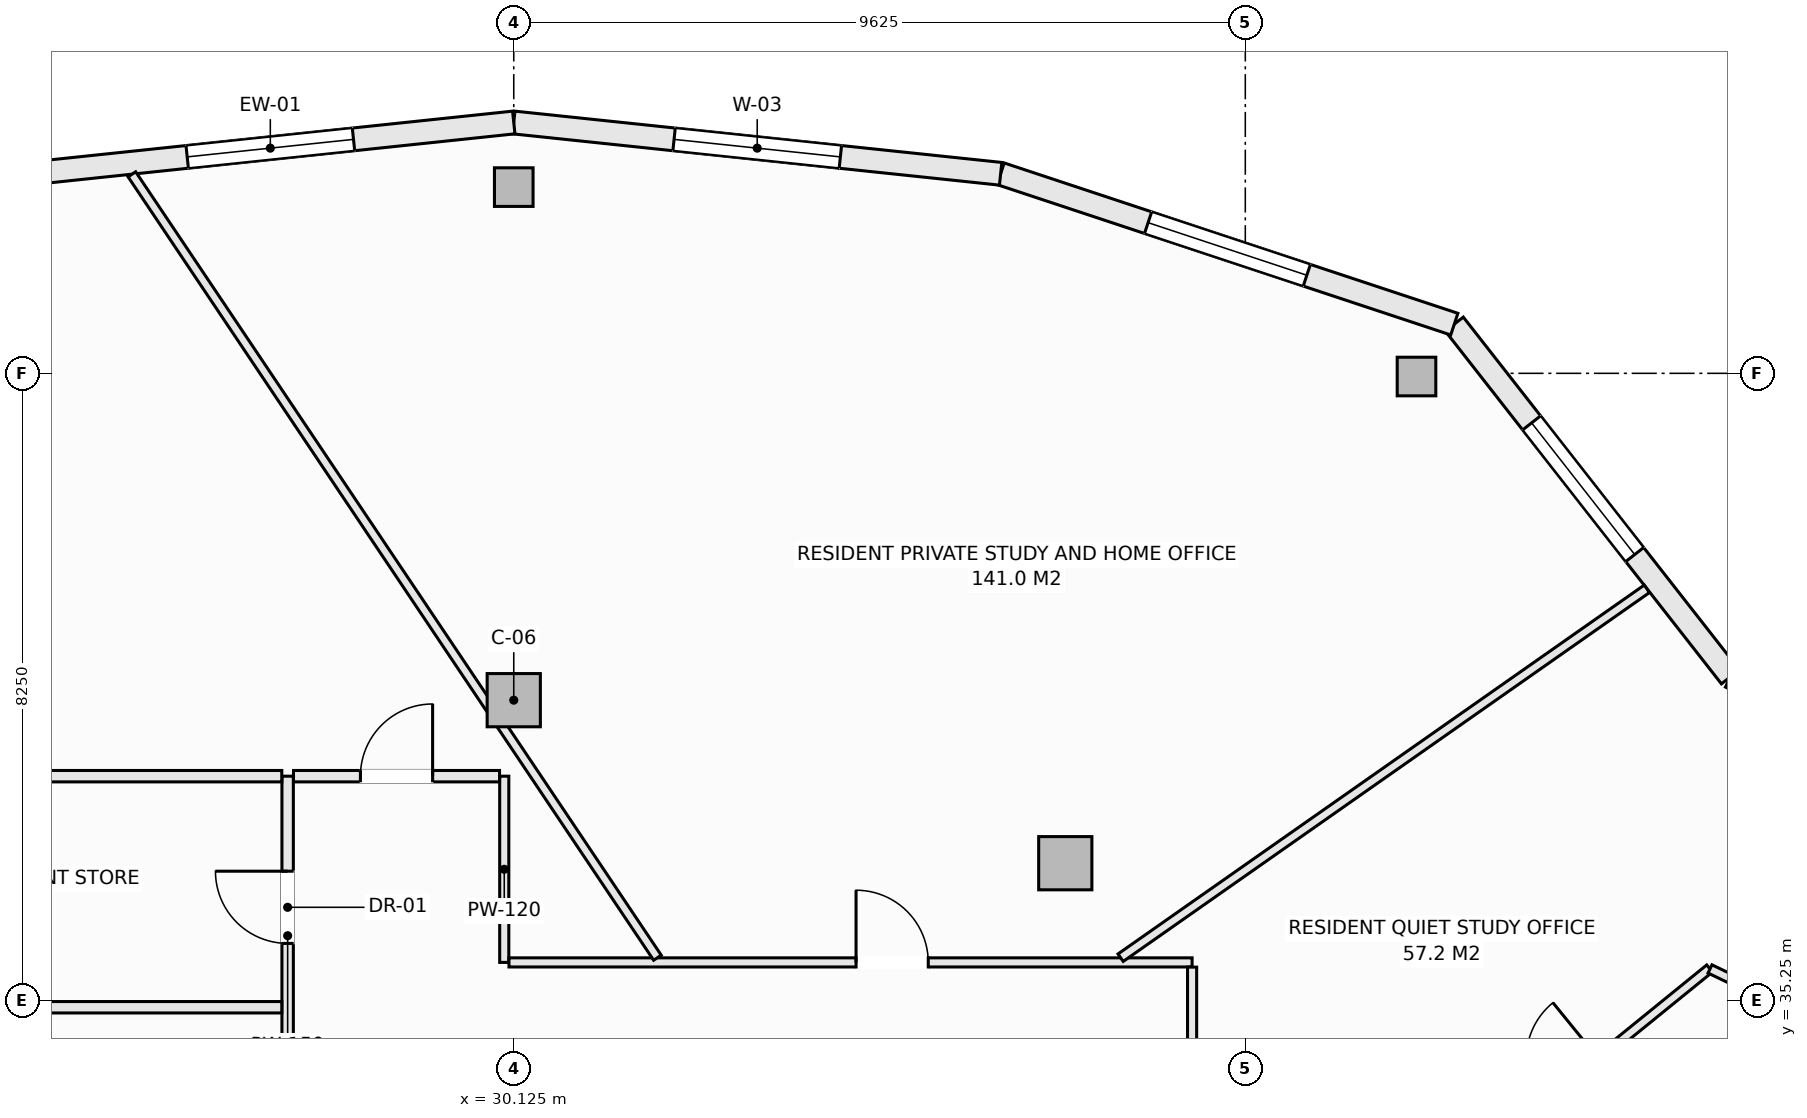
"""IFC4 building model, lengths in metres.
Left out: names, types, materials, properties, quantities, classifications, styles, units other than length and angle.
Written with IfcOpenShell. Run it as: python <this file> out.ifc"""

import sys

from ifc_helpers import new_model, si_unit, direction, frame, frame_2d, origin, origin_2d, place, context, subcontext, project, spatial, rectangle, hollow_rectangle, extrude, element, fill, save


model = new_model("IFC4")
c1 = context("Model", 3, precision=1e-05, world=origin(), true_north=direction((0.0, 1.0)))
c2 = subcontext(c1, "Body", "Model", "MODEL_VIEW")
j1 = project(units=[si_unit("LENGTHUNIT", "METRE"), si_unit("PLANEANGLEUNIT", "RADIAN")], contexts=[c1])
p1 = place(None, origin())
s1 = spatial("IfcSite", under=j1, at=p1, CompositionType="ELEMENT")
p2 = place(p1, origin())
s2 = spatial("IfcBuilding", under=s1, at=p2, CompositionType="ELEMENT")
p3 = place(p2, frame((0.0, 0.0, 222.8)))
s3 = spatial("IfcBuildingStorey", under=s2, at=p3, CompositionType="ELEMENT", Elevation=222.8)
for number, where, z_axis, x_axis in (
    (1, (42.003, 43.458, -0.27), (0.0, 0.0, 1.0), (1.0, 0.0, 0.0)),
    (2, (30.125, 45.95, -0.27), (0.0, 0.0, 1.0), (1.0, 0.0, 0.0)),
):
    element("IfcColumn", number, at=place(p3, frame(where, z_axis=z_axis, x_axis=x_axis)), inside=s3, PredefinedType="COLUMN", context=c2, shape_type="SweptSolid", body=[
        extrude(hollow_rectangle(XDim=0.508, YDim=0.508, WallThickness=0.019, at=origin_2d()), origin(), (0.0, 0.0, 1.0), 3.3),
    ])
for number, where, z_axis, x_axis in (
    (3, (37.382, 37.055, -0.27), (0.0, 0.0, 1.0), (1.0, 0.0, 0.0)),
    (4, (30.125, 39.2, -0.27), (0.0, 0.0, 1.0), (1.0, 0.0, 0.0)),
):
    element("IfcColumn", number, at=place(p3, frame(where, z_axis=z_axis, x_axis=x_axis)), inside=s3, PredefinedType="COLUMN", context=c2, shape_type="SweptSolid", body=[
        extrude(rectangle(XDim=0.7, YDim=0.7, at=origin_2d()), origin(), (0.0, 0.0, 1.0), 3.3),
    ])
p4 = place(p3, frame((46.133, 39.507, 0.0), z_axis=(0.0, 0.0, 1.0), x_axis=(0.901348331142, -0.433094892545, 0.0)))
e5 = element("IfcWall", 5, at=p4, inside=s3, PredefinedType="SOLIDWALL", context=c2, shape_type="SweptSolid", body=[
    extrude(rectangle(XDim=6.021, YDim=0.3, at=frame_2d((3.01, 0.0))), origin(), (0.0, 0.0, 1.0), 2.605),
])
p5 = place(p4, frame((1.91, 0.0, 0.72)))
e6 = element("IfcOpeningElement", 6, at=p5, cuts=e5, PredefinedType="OPENING", context=c2, shape_type="SweptSolid", body=[
    extrude(rectangle(XDim=2.2, YDim=1.65, at=frame_2d((1.1, 0.825))), frame((0.0, 0.16, 0.0), z_axis=(0.0, -1.0, 0.0), x_axis=(1.0, 0.0, 0.0)), (0.0, 0.0, 1.0), 0.32),
])
p6 = place(p3, frame((42.5, 44.147, 0.0), z_axis=(0.0, 0.0, 1.0), x_axis=(0.616450126935, -0.787393955401, 0.0)))
e7 = element("IfcWall", 7, at=p6, inside=s3, PredefinedType="SOLIDWALL", context=c2, shape_type="SweptSolid", body=[
    extrude(rectangle(XDim=5.893, YDim=0.3, at=frame_2d((2.946, 0.0))), origin(), (0.0, 0.0, 1.0), 2.605),
])
p7 = place(p6, frame((1.65, 0.0, 0.72)))
e8 = element("IfcOpeningElement", 8, at=p7, cuts=e7, PredefinedType="OPENING", context=c2, shape_type="SweptSolid", body=[
    extrude(rectangle(XDim=2.2, YDim=1.65, at=frame_2d((1.1, 0.825))), frame((0.0, 0.16, 0.0), z_axis=(0.0, -1.0, 0.0), x_axis=(1.0, 0.0, 0.0)), (0.0, 0.0, 1.0), 0.32),
])
p8 = place(p3, frame((36.531, 46.125, 0.0), z_axis=(0.0, 0.0, 1.0), x_axis=(0.949240877604, -0.314550085495, 0.0)))
e9 = element("IfcWall", 9, at=p8, inside=s3, PredefinedType="SOLIDWALL", context=c2, shape_type="SweptSolid", body=[
    extrude(rectangle(XDim=6.288, YDim=0.3, at=frame_2d((3.144, 0.0))), origin(), (0.0, 0.0, 1.0), 2.605),
])
p9 = place(p8, frame((2.044, 0.0, 0.72)))
e10 = element("IfcOpeningElement", 10, at=p9, cuts=e9, PredefinedType="OPENING", context=c2, shape_type="SweptSolid", body=[
    extrude(rectangle(XDim=2.2, YDim=1.65, at=frame_2d((1.1, 0.825))), frame((0.0, 0.16, 0.0), z_axis=(0.0, -1.0, 0.0), x_axis=(1.0, 0.0, 0.0)), (0.0, 0.0, 1.0), 0.32),
])
p10 = place(p3, frame((30.125, 46.8, 0.0), z_axis=(0.0, 0.0, 1.0), x_axis=(0.994497142298, -0.104763705363, 0.0)))
e11 = element("IfcWall", 11, at=p10, inside=s3, PredefinedType="SOLIDWALL", context=c2, shape_type="SweptSolid", body=[
    extrude(rectangle(XDim=6.441, YDim=0.3, at=frame_2d((3.221, 0.0))), origin(), (0.0, 0.0, 1.0), 2.605),
])
p11 = place(p10, frame((2.121, 0.0, 0.72)))
e12 = element("IfcOpeningElement", 12, at=p11, cuts=e11, PredefinedType="OPENING", context=c2, shape_type="SweptSolid", body=[
    extrude(rectangle(XDim=2.2, YDim=1.65, at=frame_2d((1.1, 0.825))), frame((0.0, 0.16, 0.0), z_axis=(0.0, -1.0, 0.0), x_axis=(1.0, 0.0, 0.0)), (0.0, 0.0, 1.0), 0.32),
])
p12 = place(p3, frame((23.719, 46.125, 0.0), z_axis=(0.0, 0.0, 1.0), x_axis=(0.994497142298, 0.104763705363, 0.0)))
e13 = element("IfcWall", 13, at=p12, inside=s3, PredefinedType="SOLIDWALL", context=c2, shape_type="SweptSolid", body=[
    extrude(rectangle(XDim=6.441, YDim=0.3, at=frame_2d((3.221, 0.0))), origin(), (0.0, 0.0, 1.0), 2.605),
])
p13 = place(p12, frame((2.121, 0.0, 0.72)))
e14 = element("IfcOpeningElement", 14, at=p13, cuts=e13, PredefinedType="OPENING", context=c2, shape_type="SweptSolid", body=[
    extrude(rectangle(XDim=2.2, YDim=1.65, at=frame_2d((1.1, 0.825))), frame((0.0, 0.16, 0.0), z_axis=(0.0, -1.0, 0.0), x_axis=(1.0, 0.0, 0.0)), (0.0, 0.0, 1.0), 0.32),
])
p14 = place(p3, frame((27.15, 34.002, 0.0), z_axis=(0.0, 0.0, 1.0), x_axis=(0.0, 1.0, 0.0)))
e15 = element("IfcWall", 15, at=p14, inside=s3, PredefinedType="PARTITIONING", context=c2, shape_type="SweptSolid", body=[
    extrude(rectangle(XDim=4.198, YDim=0.15, at=frame_2d((2.099, 0.0))), origin(), (0.0, 0.0, 1.0), 3.03),
])
p15 = place(p14, frame((1.998, 0.0, 0.0)))
e16 = element("IfcOpeningElement", 16, at=p15, cuts=e15, PredefinedType="OPENING", context=c2, shape_type="SweptSolid", body=[
    extrude(rectangle(XDim=0.95, YDim=2.1, at=frame_2d((0.475, 1.05))), frame((0.0, 0.085, 0.0), z_axis=(0.0, -1.0, 0.0), x_axis=(1.0, 0.0, 0.0)), (0.0, 0.0, 1.0), 0.17),
])
p16 = place(p3, frame((30.0, 35.75, 0.0), z_axis=(0.0, 0.0, 1.0), x_axis=(0.0, 1.0, 0.0)))
e17 = element("IfcWall", 17, at=p16, inside=s3, PredefinedType="PARTITIONING", context=c2, shape_type="SweptSolid", body=[
    extrude(rectangle(XDim=2.45, YDim=0.12, at=frame_2d((1.225, 0.0))), origin(), (0.0, 0.0, 1.0), 3.03),
])
p17 = place(p3, frame((18.5, 35.16, 0.0), z_axis=(0.0, 0.0, 1.0), x_axis=(1.0, 0.0, 0.0)))
e18 = element("IfcWall", 18, at=p17, inside=s3, PredefinedType="PARTITIONING", context=c2, shape_type="SweptSolid", body=[
    extrude(rectangle(XDim=8.573, YDim=0.15, at=frame_2d((4.287, 0.0))), origin(), (0.0, 0.0, 1.0), 3.03),
])
p18 = place(p3, frame((18.577, 38.2, 0.0), z_axis=(0.0, 0.0, 1.0), x_axis=(1.0, 0.0, 0.0)))
e19 = element("IfcWall", 19, at=p18, inside=s3, PredefinedType="PARTITIONING", context=c2, shape_type="SweptSolid", body=[
    extrude(rectangle(XDim=8.496, YDim=0.15, at=frame_2d((4.248, 0.0))), origin(), (0.0, 0.0, 1.0), 3.03),
])
p19 = place(p3, frame((27.227, 38.2, 0.0), z_axis=(0.0, 0.0, 1.0), x_axis=(1.0, 0.0, 0.0)))
e20 = element("IfcWall", 20, at=p19, inside=s3, PredefinedType="PARTITIONING", context=c2, shape_type="SweptSolid", body=[
    extrude(rectangle(XDim=2.711, YDim=0.15, at=frame_2d((1.355, 0.0))), origin(), (0.0, 0.0, 1.0), 3.03),
])
p20 = place(p19, frame((0.881, 0.0, 0.0)))
e21 = element("IfcOpeningElement", 21, at=p20, cuts=e20, PredefinedType="OPENING", context=c2, shape_type="SweptSolid", body=[
    extrude(rectangle(XDim=0.95, YDim=2.1, at=frame_2d((0.475, 1.05))), frame((0.0, 0.085, 0.0), z_axis=(0.0, -1.0, 0.0), x_axis=(1.0, 0.0, 0.0)), (0.0, 0.0, 1.0), 0.17),
])
p21 = place(p3, frame((30.062, 35.75, 0.0), z_axis=(0.0, 0.0, 1.0), x_axis=(1.0, 0.0, 0.0)))
e22 = element("IfcWall", 22, at=p21, inside=s3, PredefinedType="PARTITIONING", context=c2, shape_type="SweptSolid", body=[
    extrude(rectangle(XDim=8.988, YDim=0.12, at=frame_2d((4.494, 0.0))), origin(), (0.0, 0.0, 1.0), 2.478),
])
p22 = place(p21, frame((4.567, 0.0, 0.0)))
e23 = element("IfcOpeningElement", 23, at=p22, cuts=e22, PredefinedType="OPENING", context=c2, shape_type="SweptSolid", body=[
    extrude(rectangle(XDim=0.95, YDim=2.1, at=frame_2d((0.475, 1.05))), frame((0.0, 0.07, 0.0), z_axis=(0.0, -1.0, 0.0), x_axis=(1.0, 0.0, 0.0)), (0.0, 0.0, 1.0), 0.14),
])
p23 = place(p3, frame((39.05, 33.75, 0.0), z_axis=(0.0, 0.0, 1.0), x_axis=(0.0, 1.0, 0.0)))
e24 = element("IfcWall", 24, at=p23, inside=s3, PredefinedType="PARTITIONING", context=c2, shape_type="SweptSolid", body=[
    extrude(rectangle(XDim=1.938, YDim=0.12, at=frame_2d((0.969, 0.0))), origin(), (0.0, 0.0, 1.0), 3.03),
])
p24 = place(p3, frame((42.196, 32.696, 0.0), z_axis=(0.0, 0.0, 1.0), x_axis=(0.776319732197, 0.630339331949, 0.0)))
e25 = element("IfcWall", 25, at=p24, inside=s3, PredefinedType="PARTITIONING", context=c2, shape_type="SweptSolid", body=[
    extrude(rectangle(XDim=4.718, YDim=0.12, at=frame_2d((2.359, 0.0))), origin(), (0.0, 0.0, 1.0), 2.77),
])
p25 = place(p24, frame((1.884, 0.0, 0.0)))
e26 = element("IfcOpeningElement", 26, at=p25, cuts=e25, PredefinedType="OPENING", context=c2, shape_type="SweptSolid", body=[
    extrude(rectangle(XDim=0.95, YDim=2.1, at=frame_2d((0.475, 1.05))), frame((0.0, 0.07, 0.0), z_axis=(0.0, -1.0, 0.0), x_axis=(1.0, 0.0, 0.0)), (0.0, 0.0, 1.0), 0.14),
])
p26 = place(p3, frame((45.864, 35.664, 0.0), z_axis=(0.0, 0.0, 1.0), x_axis=(0.901492416592, -0.432794896951, 0.0)))
e27 = element("IfcWall", 27, at=p26, inside=s3, PredefinedType="PARTITIONING", context=c2, shape_type="SweptSolid", body=[
    extrude(rectangle(XDim=2.611, YDim=0.12, at=frame_2d((1.306, 0.0))), origin(), (0.0, 0.0, 1.0), 3.03),
])
p27 = place(p3, frame((38.11, 35.812, 0.0), z_axis=(0.0, 0.0, 1.0), x_axis=(0.81888313017, 0.57396029403, 0.0)))
e28 = element("IfcWall", 28, at=p27, inside=s3, PredefinedType="PARTITIONING", context=c2, shape_type="SweptSolid", body=[
    extrude(rectangle(XDim=8.455, YDim=0.12, at=frame_2d((4.228, 0.0))), origin(), (0.0, 0.0, 1.0), 3.03),
])
p28 = place(p3, frame((25.101, 46.118, 0.0), z_axis=(0.0, 0.0, 1.0), x_axis=(0.557162782685, -0.830403295749, 0.0)))
e29 = element("IfcWall", 29, at=p28, inside=s3, PredefinedType="PARTITIONING", context=c2, shape_type="SweptSolid", body=[
    extrude(rectangle(XDim=12.411, YDim=0.12, at=frame_2d((6.205, 0.0))), origin(), (0.0, 0.0, 1.0), 3.03),
])
p29 = place(p7, origin())
e30 = element("IfcWindow", 30, at=p29, inside=s3, PartitioningType="SINGLE_PANEL", PredefinedType="WINDOW", context=c2, shape_type="SweptSolid", body=[
    extrude(rectangle(XDim=2.2, YDim=1.65, at=frame_2d((1.1, 0.825))), frame((0.0, 0.03, 0.0), z_axis=(0.0, -1.0, 0.0), x_axis=(1.0, 0.0, 0.0)), (0.0, 0.0, 1.0), 0.06),
])
fill(e8, e30)
p30 = place(p9, origin())
e31 = element("IfcWindow", 31, at=p30, inside=s3, PartitioningType="SINGLE_PANEL", PredefinedType="WINDOW", context=c2, shape_type="SweptSolid", body=[
    extrude(rectangle(XDim=2.2, YDim=1.65, at=frame_2d((1.1, 0.825))), frame((0.0, 0.03, 0.0), z_axis=(0.0, -1.0, 0.0), x_axis=(1.0, 0.0, 0.0)), (0.0, 0.0, 1.0), 0.06),
])
fill(e10, e31)
p31 = place(p11, origin())
e32 = element("IfcWindow", 32, at=p31, inside=s3, PartitioningType="SINGLE_PANEL", PredefinedType="WINDOW", context=c2, shape_type="SweptSolid", body=[
    extrude(rectangle(XDim=2.2, YDim=1.65, at=frame_2d((1.1, 0.825))), frame((0.0, 0.03, 0.0), z_axis=(0.0, -1.0, 0.0), x_axis=(1.0, 0.0, 0.0)), (0.0, 0.0, 1.0), 0.06),
])
fill(e12, e32)
p32 = place(p13, origin())
e33 = element("IfcWindow", 33, at=p32, inside=s3, PartitioningType="SINGLE_PANEL", PredefinedType="WINDOW", context=c2, shape_type="SweptSolid", body=[
    extrude(rectangle(XDim=2.2, YDim=1.65, at=frame_2d((1.1, 0.825))), frame((0.0, 0.03, 0.0), z_axis=(0.0, -1.0, 0.0), x_axis=(1.0, 0.0, 0.0)), (0.0, 0.0, 1.0), 0.06),
])
fill(e14, e33)
p33 = place(p15, origin())
e34 = element("IfcDoor", 34, at=p33, inside=s3, OperationType="SINGLE_SWING_RIGHT", PredefinedType="DOOR", context=c2, shape_type="SweptSolid", body=[
    extrude(rectangle(XDim=0.95, YDim=2.1, at=frame_2d((0.475, 1.05))), frame((0.0, 0.025, 0.0), z_axis=(0.0, -1.0, 0.0), x_axis=(1.0, 0.0, 0.0)), (0.0, 0.0, 1.0), 0.05),
])
fill(e16, e34)
p34 = place(p22, origin())
e35 = element("IfcDoor", 35, at=p34, inside=s3, OperationType="SINGLE_SWING_LEFT", PredefinedType="DOOR", context=c2, shape_type="SweptSolid", body=[
    extrude(rectangle(XDim=0.95, YDim=2.1, at=frame_2d((0.475, 1.05))), frame((0.0, 0.025, 0.0), z_axis=(0.0, -1.0, 0.0), x_axis=(1.0, 0.0, 0.0)), (0.0, 0.0, 1.0), 0.05),
])
fill(e23, e35)
p35 = place(p20, origin())
e36 = element("IfcDoor", 36, at=p35, inside=s3, OperationType="SINGLE_SWING_RIGHT", PredefinedType="DOOR", context=c2, shape_type="SweptSolid", body=[
    extrude(rectangle(XDim=0.95, YDim=2.1, at=frame_2d((0.475, 1.05))), frame((0.0, 0.025, 0.0), z_axis=(0.0, -1.0, 0.0), x_axis=(1.0, 0.0, 0.0)), (0.0, 0.0, 1.0), 0.05),
])
fill(e21, e36)
save(model, sys.argv[1])
